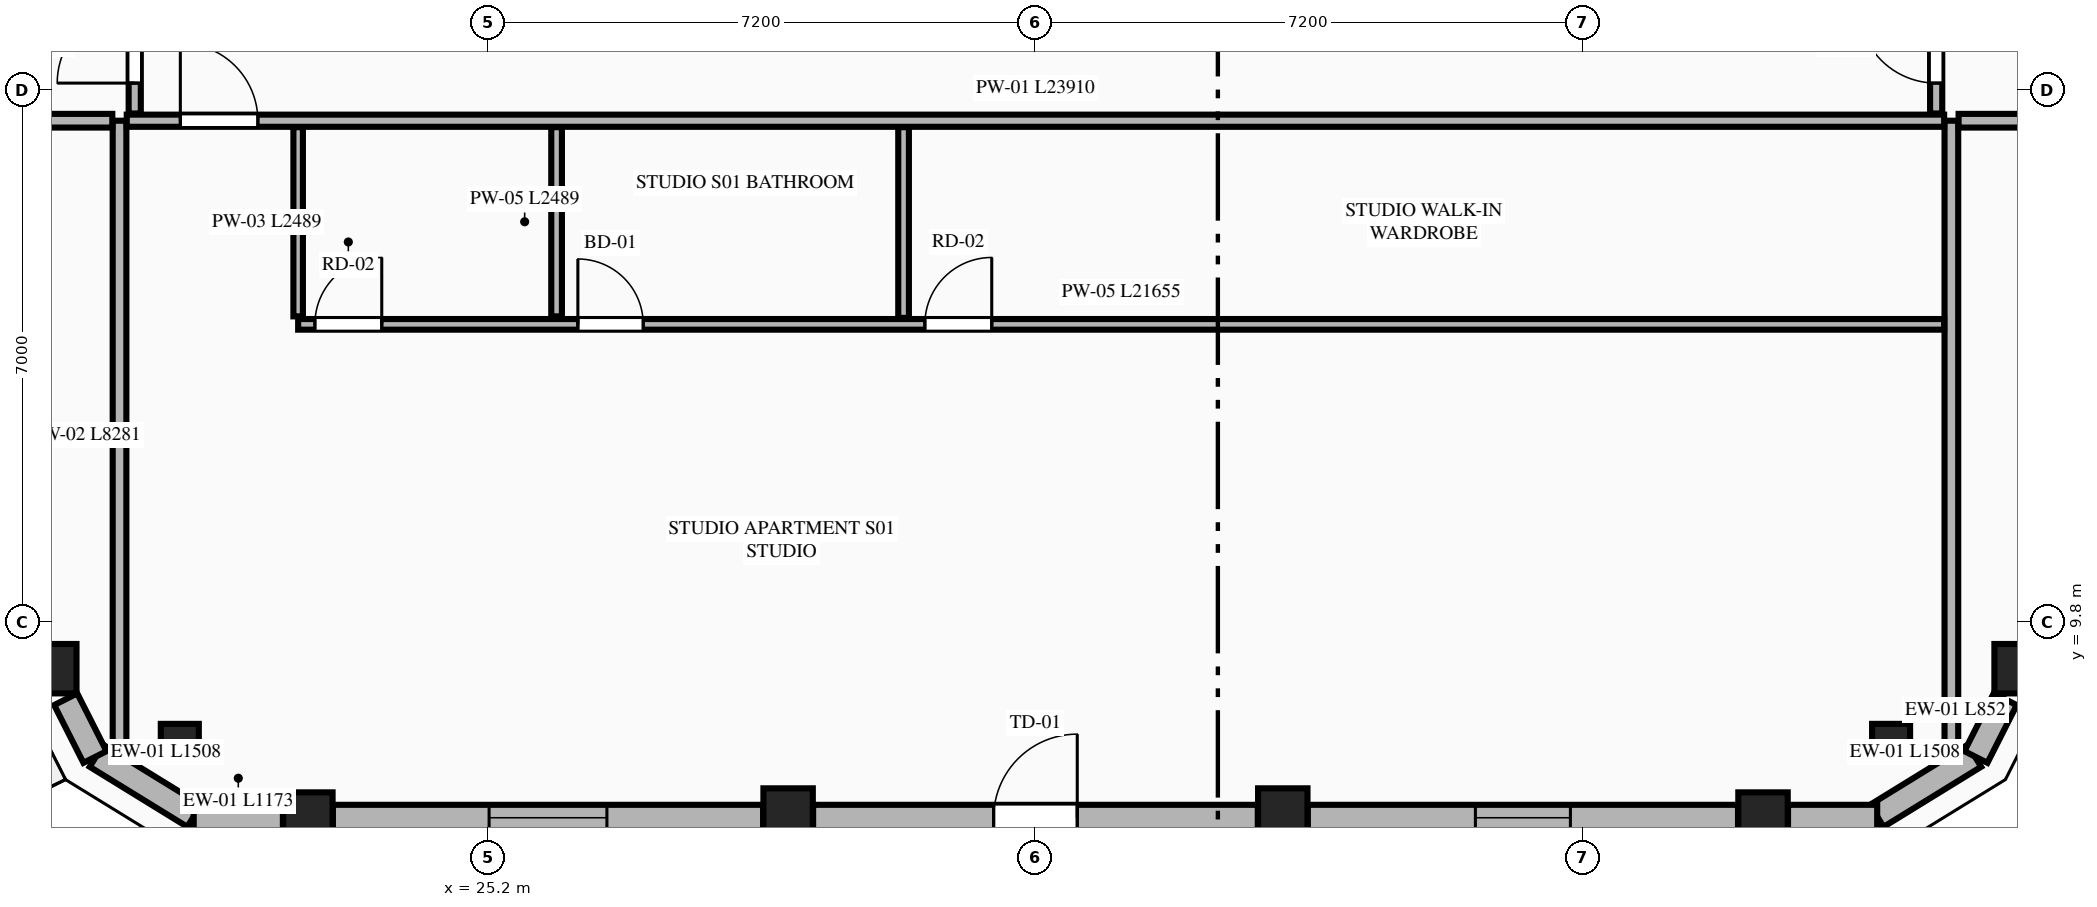
"""IFC4 building model, lengths in metres.
Left out: names, types, materials, properties, quantities, classifications, styles, units other than length and angle.
Written with IfcOpenShell. Run it as: python <this file> out.ifc"""

import sys

from ifc_helpers import new_model, si_unit, direction, frame, frame_2d, origin, origin_2d, place, context, subcontext, project, spatial, rectangle, extrude, element, fill, save


model = new_model("IFC4")
c1 = context("Model", 3, precision=1e-05, world=origin(), true_north=direction((0.0, 1.0)))
c2 = subcontext(c1, "Body", "Model", "MODEL_VIEW")
j1 = project(units=[si_unit("LENGTHUNIT", "METRE"), si_unit("PLANEANGLEUNIT", "RADIAN")], contexts=[c1])
p1 = place(None, origin())
s1 = spatial("IfcSite", under=j1, at=p1, CompositionType="ELEMENT")
p2 = place(p1, origin())
s2 = spatial("IfcBuilding", under=s1, at=p2, CompositionType="ELEMENT")
p3 = place(p2, frame((0.0, 0.0, 267.15)))
s3 = spatial("IfcBuildingStorey", under=s2, at=p3, CompositionType="ELEMENT", Elevation=267.15)
for number, where, z_axis, x_axis in (
    (1, (22.828, 7.239, 0.0), (0.0, 0.0, 1.0), (1.0, 0.0, 0.0)),
    (2, (29.146, 7.292, 0.0), (0.0, 0.0, 1.0), (1.0, 0.0, 0.0)),
    (3, (35.654, 7.292, 0.0), (0.0, 0.0, 1.0), (1.0, 0.0, 0.0)),
    (4, (41.972, 7.239, 0.0), (0.0, 0.0, 1.0), (1.0, 0.0, 0.0)),
    (5, (45.341, 9.191, 0.0), (0.0, 0.0, 1.0), (1.0, 0.0, 0.0)),
    (6, (19.459, 9.191, 0.0), (0.0, 0.0, 1.0), (1.0, 0.0, 0.0)),
):
    element("IfcColumn", number, at=place(p3, frame(where, z_axis=z_axis, x_axis=x_axis)), inside=s3, PredefinedType="COLUMN", context=c2, shape_type="SweptSolid", body=[
        extrude(rectangle(XDim=0.65, YDim=0.65, at=origin_2d()), origin(), (0.0, 0.0, 1.0), 3.65),
    ])
for number, where, z_axis, x_axis in (
    (7, (21.143, 8.215, 0.0), (0.0, 0.0, 1.0), (0.865, -0.501, 0.0)),
    (8, (43.657, 8.215, 0.0), (0.0, 0.0, 1.0), (0.865, 0.501, 0.0)),
):
    element("IfcColumn", number, at=place(p3, frame(where, z_axis=z_axis, x_axis=x_axis)), inside=s3, PredefinedType="PILASTER", context=c2, shape_type="SweptSolid", body=[
        extrude(rectangle(XDim=0.5, YDim=0.35, at=origin_2d()), origin(), (0.0, 0.0, 1.0), 3.65),
    ])
for number, where, z_axis, x_axis in (
    (9, (20.047, 8.045, 0.0), (0.0, 0.0, 1.0), (0.852, -0.524, 0.0)),
    (10, (43.469, 7.255, 0.0), (0.0, 0.0, 1.0), (0.852, 0.524, 0.0)),
):
    element("IfcWall", number, at=place(p3, frame(where, z_axis=z_axis, x_axis=x_axis)), inside=s3, PredefinedType="STANDARD", context=c2, shape_type="SweptSolid", body=[
        extrude(rectangle(XDim=1.508, YDim=0.34, at=frame_2d((0.754, 0.0))), origin(), (0.0, 0.0, 1.0), 3.45),
    ])
p4 = place(p3, frame((21.326, 7.23, 0.0), z_axis=(0.0, 0.0, 1.0), x_axis=(1.0, 0.0, 0.0)))
e11 = element("IfcWall", 11, at=p4, inside=s3, PredefinedType="STANDARD", context=c2, shape_type="SweptSolid", body=[
    extrude(rectangle(XDim=1.173, YDim=0.34, at=frame_2d((0.586, 0.0))), origin(), (0.0, 0.0, 1.0), 3.45),
])
p5 = place(p3, frame((23.157, 7.23, 0.0), z_axis=(0.0, 0.0, 1.0), x_axis=(1.0, 0.0, 0.0)))
e12 = element("IfcWall", 12, at=p5, inside=s3, PredefinedType="STANDARD", context=c2, shape_type="SweptSolid", body=[
    extrude(rectangle(XDim=5.66, YDim=0.34, at=frame_2d((2.83, 0.0))), origin(), (0.0, 0.0, 1.0), 2.983),
])
p6 = place(p5, frame((2.055, 0.0, 0.75)))
e13 = element("IfcOpeningElement", 13, at=p6, cuts=e12, PredefinedType="OPENING", context=c2, shape_type="SweptSolid", body=[
    extrude(rectangle(XDim=1.55, YDim=2.05, at=frame_2d((0.775, 1.025))), frame((0.0, 0.18, 0.0), z_axis=(0.0, -1.0, 0.0), x_axis=(1.0, 0.0, 0.0)), (0.0, 0.0, 1.0), 0.36),
])
p7 = place(p3, frame((29.475, 7.23, 0.0), z_axis=(0.0, 0.0, 1.0), x_axis=(1.0, 0.0, 0.0)))
e14 = element("IfcWall", 14, at=p7, inside=s3, PredefinedType="STANDARD", context=c2, shape_type="SweptSolid", body=[
    extrude(rectangle(XDim=5.85, YDim=0.34, at=frame_2d((2.925, 0.0))), origin(), (0.0, 0.0, 1.0), 2.983),
])
p8 = place(p7, frame((2.375, 0.0, 0.0)))
e15 = element("IfcOpeningElement", 15, at=p8, cuts=e14, PredefinedType="OPENING", context=c2, shape_type="SweptSolid", body=[
    extrude(rectangle(XDim=1.1, YDim=2.25, at=frame_2d((0.55, 1.125))), frame((0.0, 0.18, 0.0), z_axis=(0.0, -1.0, 0.0), x_axis=(1.0, 0.0, 0.0)), (0.0, 0.0, 1.0), 0.36),
])
p9 = place(p3, frame((35.983, 7.23, 0.0), z_axis=(0.0, 0.0, 1.0), x_axis=(1.0, 0.0, 0.0)))
e16 = element("IfcWall", 16, at=p9, inside=s3, PredefinedType="STANDARD", context=c2, shape_type="SweptSolid", body=[
    extrude(rectangle(XDim=5.66, YDim=0.34, at=frame_2d((2.83, 0.0))), origin(), (0.0, 0.0, 1.0), 2.983),
])
p10 = place(p9, frame((2.205, 0.0, 0.75)))
e17 = element("IfcOpeningElement", 17, at=p10, cuts=e16, PredefinedType="OPENING", context=c2, shape_type="SweptSolid", body=[
    extrude(rectangle(XDim=1.25, YDim=1.95, at=frame_2d((0.625, 0.975))), frame((0.0, 0.18, 0.0), z_axis=(0.0, -1.0, 0.0), x_axis=(1.0, 0.0, 0.0)), (0.0, 0.0, 1.0), 0.36),
])
p11 = place(p3, frame((42.301, 7.23, 0.0), z_axis=(0.0, 0.0, 1.0), x_axis=(1.0, 0.0, 0.0)))
e18 = element("IfcWall", 18, at=p11, inside=s3, PredefinedType="STANDARD", context=c2, shape_type="SweptSolid", body=[
    extrude(rectangle(XDim=1.173, YDim=0.34, at=frame_2d((0.586, 0.0))), origin(), (0.0, 0.0, 1.0), 3.45),
])
for number, where, z_axis, x_axis in (
    (19, (44.773, 8.029, 0.0), (0.0, 0.0, 1.0), (0.452, 0.892, 0.0)),
    (20, (19.642, 8.789, 0.0), (0.0, 0.0, 1.0), (0.452, -0.892, 0.0)),
):
    element("IfcWall", number, at=place(p3, frame(where, z_axis=z_axis, x_axis=x_axis)), inside=s3, PredefinedType="STANDARD", context=c2, shape_type="SweptSolid", body=[
        extrude(rectangle(XDim=0.852, YDim=0.34, at=frame_2d((0.426, 0.0))), origin(), (0.0, 0.0, 1.0), 3.45),
    ])
for number, where, z_axis, x_axis in (
    (21, (20.35, 8.119, 0.0), (0.0, 0.0, 1.0), (0.0, 1.0, 0.0)),
    (22, (44.45, 8.119, 0.0), (0.0, 0.0, 1.0), (0.0, 1.0, 0.0)),
):
    element("IfcWall", number, at=place(p3, frame(where, z_axis=z_axis, x_axis=x_axis)), inside=s3, PredefinedType="PARTITIONING", context=c2, shape_type="SweptSolid", body=[
        extrude(rectangle(XDim=8.281, YDim=0.18, at=frame_2d((4.141, 0.0))), origin(), (0.0, 0.0, 1.0), 3.45),
    ])
p12 = place(p3, frame((20.445, 16.4, 0.0), z_axis=(0.0, 0.0, 1.0), x_axis=(1.0, 0.0, 0.0)))
e23 = element("IfcWall", 23, at=p12, inside=s3, PredefinedType="PARTITIONING", context=c2, shape_type="SweptSolid", body=[
    extrude(rectangle(XDim=23.91, YDim=0.16, at=frame_2d((11.955, 0.0))), origin(), (0.0, 0.0, 1.0), 3.45),
])
p13 = place(p12, frame((0.705, 0.0, 0.0)))
e24 = element("IfcOpeningElement", 24, at=p13, cuts=e23, PredefinedType="OPENING", context=c2, shape_type="SweptSolid", body=[
    extrude(rectangle(XDim=1.02, YDim=2.25, at=frame_2d((0.51, 1.125))), frame((0.0, 0.09, 0.0), z_axis=(0.0, -1.0, 0.0), x_axis=(1.0, 0.0, 0.0)), (0.0, 0.0, 1.0), 0.18),
])
p14 = place(p3, frame((22.7, 13.826, 0.0), z_axis=(0.0, 0.0, 1.0), x_axis=(0.0, 1.0, 0.0)))
e25 = element("IfcWall", 25, at=p14, inside=s3, PredefinedType="PARTITIONING", context=c2, shape_type="SweptSolid", body=[
    extrude(rectangle(XDim=2.489, YDim=0.125, at=frame_2d((1.245, 0.0))), origin(), (0.0, 0.0, 1.0), 2.907),
])
p15 = place(p3, frame((22.7, 13.721, 0.0), z_axis=(0.0, 0.0, 1.0), x_axis=(1.0, 0.0, 0.0)))
e26 = element("IfcWall", 26, at=p15, inside=s3, PredefinedType="PLUMBINGWALL", context=c2, shape_type="SweptSolid", body=[
    extrude(rectangle(XDim=21.655, YDim=0.14, at=frame_2d((10.828, 0.0))), origin(), (0.0, 0.0, 1.0), 3.45),
])
p16 = place(p15, frame((3.68, 0.0, 0.0)))
e27 = element("IfcOpeningElement", 27, at=p16, cuts=e26, PredefinedType="OPENING", context=c2, shape_type="SweptSolid", body=[
    extrude(rectangle(XDim=0.86, YDim=2.1, at=frame_2d((0.43, 1.05))), frame((0.0, 0.08, 0.0), z_axis=(0.0, -1.0, 0.0), x_axis=(1.0, 0.0, 0.0)), (0.0, 0.0, 1.0), 0.16),
])
p17 = place(p15, frame((8.245, 0.0, 0.0)))
e28 = element("IfcOpeningElement", 28, at=p17, cuts=e26, PredefinedType="OPENING", context=c2, shape_type="SweptSolid", body=[
    extrude(rectangle(XDim=0.88, YDim=2.15, at=frame_2d((0.44, 1.075))), frame((0.0, 0.08, 0.0), z_axis=(0.0, -1.0, 0.0), x_axis=(1.0, 0.0, 0.0)), (0.0, 0.0, 1.0), 0.16),
])
p18 = place(p15, frame((0.22, 0.0, 0.0)))
e29 = element("IfcOpeningElement", 29, at=p18, cuts=e26, PredefinedType="OPENING", context=c2, shape_type="SweptSolid", body=[
    extrude(rectangle(XDim=0.88, YDim=2.15, at=frame_2d((0.44, 1.075))), frame((0.0, 0.08, 0.0), z_axis=(0.0, -1.0, 0.0), x_axis=(1.0, 0.0, 0.0)), (0.0, 0.0, 1.0), 0.16),
])
p19 = place(p3, frame((26.1, 13.826, 0.0), z_axis=(0.0, 0.0, 1.0), x_axis=(0.0, 1.0, 0.0)))
e30 = element("IfcWall", 30, at=p19, inside=s3, PredefinedType="PLUMBINGWALL", context=c2, shape_type="SweptSolid", body=[
    extrude(rectangle(XDim=2.489, YDim=0.14, at=frame_2d((1.245, 0.0))), origin(), (0.0, 0.0, 1.0), 3.45),
])
p20 = place(p3, frame((30.665, 13.806, 0.0), z_axis=(0.0, 0.0, 1.0), x_axis=(0.0, 1.0, 0.0)))
e31 = element("IfcWall", 31, at=p20, inside=s3, PredefinedType="PLUMBINGWALL", context=c2, shape_type="SweptSolid", body=[
    extrude(rectangle(XDim=2.509, YDim=0.14, at=frame_2d((1.254, 0.0))), origin(), (0.0, 0.0, 1.0), 3.45),
])
p21 = place(p3, frame((16.034, 16.4, 0.0), z_axis=(0.0, 0.0, 1.0), x_axis=(1.0, 0.0, 0.0)))
e32 = element("IfcWall", 32, at=p21, inside=s3, PredefinedType="PARTITIONING", context=c2, shape_type="SweptSolid", body=[
    extrude(rectangle(XDim=4.221, YDim=0.18, at=frame_2d((2.11, 0.0))), origin(), (0.0, 0.0, 1.0), 3.45),
])
p22 = place(p3, frame((44.545, 16.4, 0.0), z_axis=(0.0, 0.0, 1.0), x_axis=(1.0, 0.0, 0.0)))
e33 = element("IfcWall", 33, at=p22, inside=s3, PredefinedType="PARTITIONING", context=c2, shape_type="SweptSolid", body=[
    extrude(rectangle(XDim=4.221, YDim=0.18, at=frame_2d((2.111, 0.0))), origin(), (0.0, 0.0, 1.0), 3.45),
])
p23 = place(p3, frame((20.55, 16.495, 0.0), z_axis=(0.0, 0.0, 1.0), x_axis=(0.0, 1.0, 0.0)))
e34 = element("IfcWall", 34, at=p23, inside=s3, PredefinedType="PARTITIONING", context=c2, shape_type="SweptSolid", body=[
    extrude(rectangle(XDim=18.41, YDim=0.16, at=frame_2d((9.205, 0.0))), origin(), (0.0, 0.0, 1.0), 3.137),
])
p24 = place(p23, frame((0.4, 0.0, 0.0)))
e35 = element("IfcOpeningElement", 35, at=p24, cuts=e34, PredefinedType="OPENING", context=c2, shape_type="SweptSolid", body=[
    extrude(rectangle(XDim=1.02, YDim=2.25, at=frame_2d((0.51, 1.125))), frame((0.0, 0.09, 0.0), z_axis=(0.0, -1.0, 0.0), x_axis=(1.0, 0.0, 0.0)), (0.0, 0.0, 1.0), 0.18),
])
p25 = place(p3, frame((44.25, 16.495, 0.0), z_axis=(0.0, 0.0, 1.0), x_axis=(0.0, 1.0, 0.0)))
e36 = element("IfcWall", 36, at=p25, inside=s3, PredefinedType="PARTITIONING", context=c2, shape_type="SweptSolid", body=[
    extrude(rectangle(XDim=18.41, YDim=0.16, at=frame_2d((9.205, 0.0))), origin(), (0.0, 0.0, 1.0), 3.137),
])
p26 = place(p25, frame((0.4, 0.0, 0.0)))
e37 = element("IfcOpeningElement", 37, at=p26, cuts=e36, PredefinedType="OPENING", context=c2, shape_type="SweptSolid", body=[
    extrude(rectangle(XDim=1.02, YDim=2.25, at=frame_2d((0.51, 1.125))), frame((0.0, 0.09, 0.0), z_axis=(0.0, -1.0, 0.0), x_axis=(1.0, 0.0, 0.0)), (0.0, 0.0, 1.0), 0.18),
])
p27 = place(p6, origin())
e38 = element("IfcWindow", 38, at=p27, inside=s3, PartitioningType="SINGLE_PANEL", PredefinedType="WINDOW", context=c2, shape_type="SweptSolid", body=[
    extrude(rectangle(XDim=1.55, YDim=2.05, at=frame_2d((0.775, 1.025))), frame((0.0, 0.03, 0.0), z_axis=(0.0, -1.0, 0.0), x_axis=(1.0, 0.0, 0.0)), (0.0, 0.0, 1.0), 0.06),
])
fill(e13, e38)
p28 = place(p8, origin())
e39 = element("IfcDoor", 39, at=p28, inside=s3, OperationType="SINGLE_SWING_RIGHT", PredefinedType="DOOR", context=c2, shape_type="SweptSolid", body=[
    extrude(rectangle(XDim=1.1, YDim=2.25, at=frame_2d((0.55, 1.125))), frame((0.0, 0.025, 0.0), z_axis=(0.0, -1.0, 0.0), x_axis=(1.0, 0.0, 0.0)), (0.0, 0.0, 1.0), 0.05),
])
fill(e15, e39)
p29 = place(p10, origin())
e40 = element("IfcWindow", 40, at=p29, inside=s3, PartitioningType="SINGLE_PANEL", PredefinedType="WINDOW", context=c2, shape_type="SweptSolid", body=[
    extrude(rectangle(XDim=1.25, YDim=1.95, at=frame_2d((0.625, 0.975))), frame((0.0, 0.03, 0.0), z_axis=(0.0, -1.0, 0.0), x_axis=(1.0, 0.0, 0.0)), (0.0, 0.0, 1.0), 0.06),
])
fill(e17, e40)
p30 = place(p16, origin())
e41 = element("IfcDoor", 41, at=p30, inside=s3, OperationType="SINGLE_SWING_LEFT", PredefinedType="DOOR", context=c2, shape_type="SweptSolid", body=[
    extrude(rectangle(XDim=0.86, YDim=2.1, at=frame_2d((0.43, 1.05))), frame((0.0, 0.025, 0.0), z_axis=(0.0, -1.0, 0.0), x_axis=(1.0, 0.0, 0.0)), (0.0, 0.0, 1.0), 0.05),
])
fill(e27, e41)
p31 = place(p17, origin())
e42 = element("IfcDoor", 42, at=p31, inside=s3, OperationType="SINGLE_SWING_RIGHT", PredefinedType="DOOR", context=c2, shape_type="SweptSolid", body=[
    extrude(rectangle(XDim=0.88, YDim=2.15, at=frame_2d((0.44, 1.075))), frame((0.0, 0.025, 0.0), z_axis=(0.0, -1.0, 0.0), x_axis=(1.0, 0.0, 0.0)), (0.0, 0.0, 1.0), 0.05),
])
fill(e28, e42)
p32 = place(p13, origin())
e43 = element("IfcDoor", 43, at=p32, inside=s3, OperationType="SINGLE_SWING_LEFT", PredefinedType="DOOR", context=c2, shape_type="SweptSolid", body=[
    extrude(rectangle(XDim=1.02, YDim=2.25, at=frame_2d((0.51, 1.125))), frame((0.0, 0.025, 0.0), z_axis=(0.0, -1.0, 0.0), x_axis=(1.0, 0.0, 0.0)), (0.0, 0.0, 1.0), 0.05),
])
fill(e24, e43)
p33 = place(p18, origin())
e44 = element("IfcDoor", 44, at=p33, inside=s3, OperationType="SINGLE_SWING_RIGHT", PredefinedType="DOOR", context=c2, shape_type="SweptSolid", body=[
    extrude(rectangle(XDim=0.88, YDim=2.15, at=frame_2d((0.44, 1.075))), frame((0.0, 0.025, 0.0), z_axis=(0.0, -1.0, 0.0), x_axis=(1.0, 0.0, 0.0)), (0.0, 0.0, 1.0), 0.05),
])
fill(e29, e44)
p34 = place(p24, origin())
e45 = element("IfcDoor", 45, at=p34, inside=s3, OperationType="SINGLE_SWING_LEFT", PredefinedType="DOOR", context=c2, shape_type="SweptSolid", body=[
    extrude(rectangle(XDim=1.02, YDim=2.25, at=frame_2d((0.51, 1.125))), frame((0.0, 0.025, 0.0), z_axis=(0.0, -1.0, 0.0), x_axis=(1.0, 0.0, 0.0)), (0.0, 0.0, 1.0), 0.05),
])
fill(e35, e45)
p35 = place(p26, origin())
e46 = element("IfcDoor", 46, at=p35, inside=s3, OperationType="SINGLE_SWING_RIGHT", PredefinedType="DOOR", context=c2, shape_type="SweptSolid", body=[
    extrude(rectangle(XDim=1.02, YDim=2.25, at=frame_2d((0.51, 1.125))), frame((0.0, 0.025, 0.0), z_axis=(0.0, -1.0, 0.0), x_axis=(1.0, 0.0, 0.0)), (0.0, 0.0, 1.0), 0.05),
])
fill(e37, e46)
save(model, sys.argv[1])
